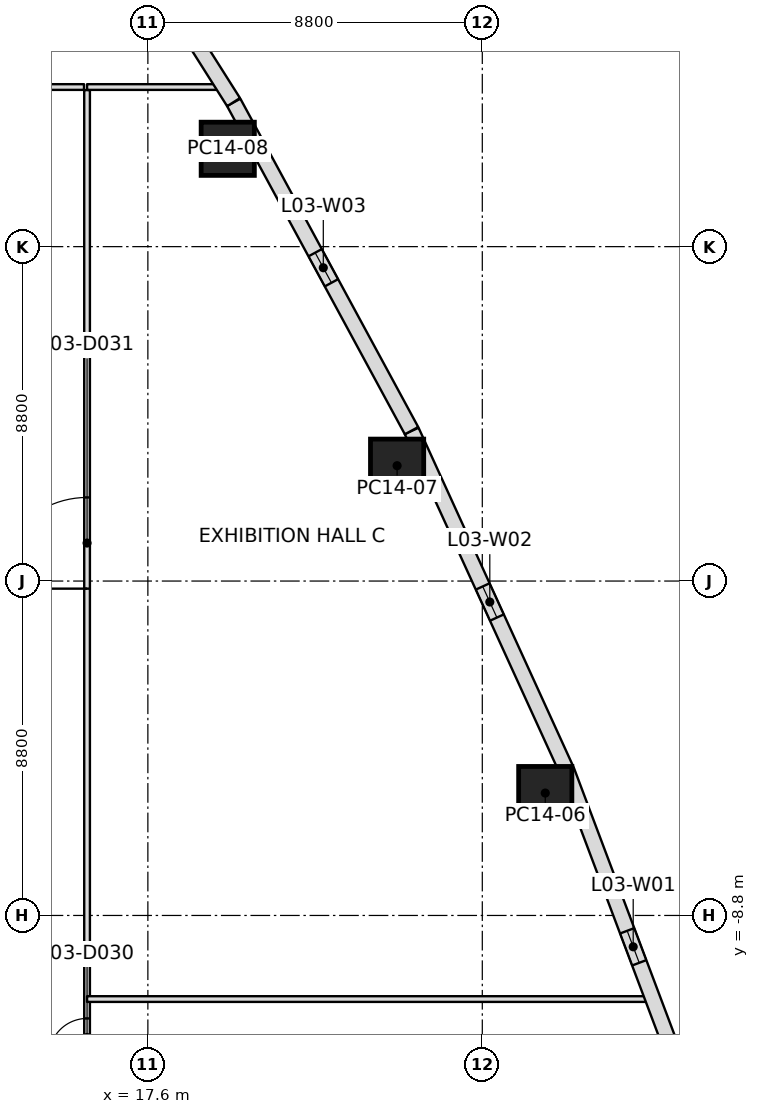
"""IFC4 building model, lengths in metres.
Left out: names, types, materials, properties, quantities, classifications, styles, units other than length and angle.
Written with IfcOpenShell. Run it as: python <this file> out.ifc"""

import sys

from ifc_helpers import new_model, si_unit, direction, frame, frame_2d, origin, origin_2d, place, context, subcontext, project, spatial, rectangle, extrude, element, fill, save


model = new_model("IFC4")
c1 = context("Model", 3, precision=1e-05, world=origin(), true_north=direction((0.0, 1.0)))
c2 = subcontext(c1, "Body", "Model", "MODEL_VIEW")
j1 = project(units=[si_unit("LENGTHUNIT", "METRE"), si_unit("PLANEANGLEUNIT", "RADIAN")], contexts=[c1])
p1 = place(None, origin())
s1 = spatial("IfcSite", under=j1, at=p1, CompositionType="ELEMENT")
p2 = place(p1, origin())
s2 = spatial("IfcBuilding", under=s1, at=p2, CompositionType="ELEMENT")
p3 = place(p2, frame((0.0, 0.0, 22.2)))
s3 = spatial("IfcBuildingStorey", under=s2, at=p3, CompositionType="ELEMENT", Elevation=22.2)
for number, where, z_axis, x_axis in (
    (1, (28.057, -5.579, 0.0), (0.0, 0.0, 1.0), (-0.382, 0.924, 0.0)),
    (2, (24.158, 3.035, 0.0), (0.0, 0.0, 1.0), (-0.442, 0.897, 0.0)),
    (3, (19.702, 11.375, 0.0), (0.0, 0.0, 1.0), (-0.5, 0.866, 0.0)),
):
    element("IfcColumn", number, at=place(p3, frame(where, z_axis=z_axis, x_axis=x_axis)), inside=s3, PredefinedType="COLUMN", context=c2, shape_type="SweptSolid", body=[
        extrude(rectangle(XDim=1.4, YDim=1.4, at=origin_2d()), origin(), (0.0, 0.0, 1.0), 6.6),
    ])
p4 = place(p3, frame((28.625, -4.993, 0.0), z_axis=(0.0, 0.0, 1.0), x_axis=(0.352569865932, -0.935785493389, 0.0)))
e4 = element("IfcWall", 4, at=p4, inside=s3, PredefinedType="STANDARD", context=c2, shape_type="SweptSolid", body=[
    extrude(rectangle(XDim=9.838, YDim=0.4, at=frame_2d((4.919, 0.0))), origin(), (0.0, 0.0, 1.0), 5.7),
])
p5 = place(p4, frame((4.5, 0.0, 0.9)))
e5 = element("IfcOpeningElement", 5, at=p5, cuts=e4, PredefinedType="OPENING", context=c2, shape_type="SweptSolid", body=[
    extrude(rectangle(XDim=0.9, YDim=3.3, at=frame_2d((0.45, 1.65))), frame((0.0, 0.2, 0.0), z_axis=(0.0, -1.0, 0.0), x_axis=(1.0, 0.0, 0.0)), (0.0, 0.0, 1.0), 0.4),
])
p6 = place(p3, frame((24.541, 3.951, 0.0), z_axis=(0.0, 0.0, 1.0), x_axis=(0.415399179946, -0.909639225902, 0.0)))
e6 = element("IfcWall", 6, at=p6, inside=s3, PredefinedType="STANDARD", context=c2, shape_type="SweptSolid", body=[
    extrude(rectangle(XDim=9.826, YDim=0.4, at=frame_2d((4.913, 0.0))), origin(), (0.0, 0.0, 1.0), 5.7),
])
p7 = place(p6, frame((4.5, 0.0, 0.9)))
e7 = element("IfcOpeningElement", 7, at=p7, cuts=e6, PredefinedType="OPENING", context=c2, shape_type="SweptSolid", body=[
    extrude(rectangle(XDim=0.9, YDim=3.3, at=frame_2d((0.45, 1.65))), frame((0.0, 0.2, 0.0), z_axis=(0.0, -1.0, 0.0), x_axis=(1.0, 0.0, 0.0)), (0.0, 0.0, 1.0), 0.4),
])
p8 = place(p3, frame((19.859, 12.597, 0.0), z_axis=(0.0, 0.0, 1.0), x_axis=(0.476254331716, -0.879307575039, 0.0)))
e8 = element("IfcWall", 8, at=p8, inside=s3, PredefinedType="STANDARD", context=c2, shape_type="SweptSolid", body=[
    extrude(rectangle(XDim=9.825, YDim=0.4, at=frame_2d((4.913, 0.0))), origin(), (0.0, 0.0, 1.0), 5.7),
])
p9 = place(p8, frame((4.5, 0.0, 0.9)))
e9 = element("IfcOpeningElement", 9, at=p9, cuts=e8, PredefinedType="OPENING", context=c2, shape_type="SweptSolid", body=[
    extrude(rectangle(XDim=0.9, YDim=3.3, at=frame_2d((0.45, 1.65))), frame((0.0, 0.2, 0.0), z_axis=(0.0, -1.0, 0.0), x_axis=(1.0, 0.0, 0.0)), (0.0, 0.0, 1.0), 0.4),
])
p10 = place(p3, frame((14.599, 20.905, 0.0), z_axis=(0.0, 0.0, 1.0), x_axis=(0.534912566476, -0.844907418731, 0.0)))
e10 = element("IfcWall", 10, at=p10, inside=s3, PredefinedType="STANDARD", context=c2, shape_type="SweptSolid", body=[
    extrude(rectangle(XDim=9.826, YDim=0.4, at=frame_2d((4.913, 0.0))), origin(), (0.0, 0.0, 1.0), 5.7),
])
p11 = place(p10, frame((4.5, 0.0, 0.9)))
e11 = element("IfcOpeningElement", 11, at=p11, cuts=e10, PredefinedType="OPENING", context=c2, shape_type="SweptSolid", body=[
    extrude(rectangle(XDim=0.9, YDim=3.3, at=frame_2d((0.45, 1.65))), frame((0.0, 0.2, 0.0), z_axis=(0.0, -1.0, 0.0), x_axis=(1.0, 0.0, 0.0)), (0.0, 0.0, 1.0), 0.4),
])
p12 = place(p3, frame((16.0, -11.0, 0.0), z_axis=(0.0, 0.0, 1.0), x_axis=(1.0, 0.0, 0.0)))
e12 = element("IfcWall", 12, at=p12, inside=s3, PredefinedType="PARTITIONING", context=c2, shape_type="SweptSolid", body=[
    extrude(rectangle(XDim=14.839, YDim=0.15, at=frame_2d((7.419, 0.0))), origin(), (0.0, 0.0, 1.0), 5.447),
])
p13 = place(p3, frame((19.479, 13.0, 0.0), z_axis=(0.0, 0.0, 1.0), x_axis=(-1.0, 0.0, 0.0)))
e13 = element("IfcWall", 13, at=p13, inside=s3, PredefinedType="PARTITIONING", context=c2, shape_type="SweptSolid", body=[
    extrude(rectangle(XDim=3.479, YDim=0.15, at=frame_2d((1.74, 0.0))), origin(), (0.0, 0.0, 1.0), 5.734),
])
p14 = place(p3, frame((15.92, 13.0, 0.0), z_axis=(0.0, 0.0, 1.0), x_axis=(-1.0, 0.0, 0.0)))
e14 = element("IfcWall", 14, at=p14, inside=s3, PredefinedType="PARTITIONING", context=c2, shape_type="SweptSolid", body=[
    extrude(rectangle(XDim=31.84, YDim=0.15, at=frame_2d((15.92, 0.0))), origin(), (0.0, 0.0, 1.0), 5.447),
])
p15 = place(p14, frame((5.32, 0.0, 0.0)))
e15 = element("IfcOpeningElement", 15, at=p15, cuts=e14, PredefinedType="OPENING", context=c2, shape_type="SweptSolid", body=[
    extrude(rectangle(XDim=1.0, YDim=2.1, at=frame_2d((0.5, 1.05))), frame((0.0, 0.075, 0.0), z_axis=(0.0, -1.0, 0.0), x_axis=(1.0, 0.0, 0.0)), (0.0, 0.0, 1.0), 0.15),
])
p16 = place(p14, frame((1.26, 0.0, 0.0)))
e16 = element("IfcOpeningElement", 16, at=p16, cuts=e14, PredefinedType="OPENING", context=c2, shape_type="SweptSolid", body=[
    extrude(rectangle(XDim=1.0, YDim=2.1, at=frame_2d((0.5, 1.05))), frame((0.0, 0.075, 0.0), z_axis=(0.0, -1.0, 0.0), x_axis=(1.0, 0.0, 0.0)), (0.0, 0.0, 1.0), 0.15),
])
p17 = place(p14, frame((18.73, 0.0, 0.0)))
e17 = element("IfcOpeningElement", 17, at=p17, cuts=e14, PredefinedType="OPENING", context=c2, shape_type="SweptSolid", body=[
    extrude(rectangle(XDim=2.4, YDim=2.1, at=frame_2d((1.2, 1.05))), frame((0.0, 0.075, 0.0), z_axis=(0.0, -1.0, 0.0), x_axis=(1.0, 0.0, 0.0)), (0.0, 0.0, 1.0), 0.15),
])
p18 = place(p3, frame((16.0, -12.92, 0.0), z_axis=(0.0, 0.0, 1.0), x_axis=(0.0, 1.0, 0.0)))
e18 = element("IfcWall", 18, at=p18, inside=s3, PredefinedType="PARTITIONING", context=c2, shape_type="SweptSolid", body=[
    extrude(rectangle(XDim=25.84, YDim=0.15, at=frame_2d((12.92, 0.0))), origin(), (0.0, 0.0, 1.0), 5.447),
])
p19 = place(p18, frame((0.41, 0.0, 0.0)))
e19 = element("IfcOpeningElement", 19, at=p19, cuts=e18, PredefinedType="OPENING", context=c2, shape_type="SweptSolid", body=[
    extrude(rectangle(XDim=1.0, YDim=2.1, at=frame_2d((0.5, 1.05))), frame((0.0, 0.075, 0.0), z_axis=(0.0, -1.0, 0.0), x_axis=(1.0, 0.0, 0.0)), (0.0, 0.0, 1.0), 0.15),
])
p20 = place(p18, frame((12.72, 0.0, 0.0)))
e20 = element("IfcOpeningElement", 20, at=p20, cuts=e18, PredefinedType="OPENING", context=c2, shape_type="SweptSolid", body=[
    extrude(rectangle(XDim=2.4, YDim=2.1, at=frame_2d((1.2, 1.05))), frame((0.0, 0.075, 0.0), z_axis=(0.0, -1.0, 0.0), x_axis=(1.0, 0.0, 0.0)), (0.0, 0.0, 1.0), 0.15),
])
p21 = place(p5, origin())
e21 = element("IfcWindow", 21, at=p21, inside=s3, PartitioningType="SINGLE_PANEL", PredefinedType="WINDOW", context=c2, shape_type="SweptSolid", body=[
    extrude(rectangle(XDim=0.9, YDim=3.3, at=frame_2d((0.45, 1.65))), frame((0.0, 0.03, 0.0), z_axis=(0.0, -1.0, 0.0), x_axis=(1.0, 0.0, 0.0)), (0.0, 0.0, 1.0), 0.06),
])
fill(e5, e21)
p22 = place(p7, origin())
e22 = element("IfcWindow", 22, at=p22, inside=s3, PartitioningType="SINGLE_PANEL", PredefinedType="WINDOW", context=c2, shape_type="SweptSolid", body=[
    extrude(rectangle(XDim=0.9, YDim=3.3, at=frame_2d((0.45, 1.65))), frame((0.0, 0.03, 0.0), z_axis=(0.0, -1.0, 0.0), x_axis=(1.0, 0.0, 0.0)), (0.0, 0.0, 1.0), 0.06),
])
fill(e7, e22)
p23 = place(p9, origin())
e23 = element("IfcWindow", 23, at=p23, inside=s3, PartitioningType="SINGLE_PANEL", PredefinedType="WINDOW", context=c2, shape_type="SweptSolid", body=[
    extrude(rectangle(XDim=0.9, YDim=3.3, at=frame_2d((0.45, 1.65))), frame((0.0, 0.03, 0.0), z_axis=(0.0, -1.0, 0.0), x_axis=(1.0, 0.0, 0.0)), (0.0, 0.0, 1.0), 0.06),
])
fill(e9, e23)
p24 = place(p19, origin())
e24 = element("IfcDoor", 24, at=p24, inside=s3, OperationType="SINGLE_SWING_RIGHT", PredefinedType="DOOR", context=c2, shape_type="SweptSolid", body=[
    extrude(rectangle(XDim=1.0, YDim=2.1, at=frame_2d((0.5, 1.05))), frame((0.0, 0.025, 0.0), z_axis=(0.0, -1.0, 0.0), x_axis=(1.0, 0.0, 0.0)), (0.0, 0.0, 1.0), 0.05),
])
fill(e19, e24)
p25 = place(p20, origin())
e25 = element("IfcDoor", 25, at=p25, inside=s3, OperationType="DOUBLE_DOOR_SINGLE_SWING", PredefinedType="DOOR", context=c2, shape_type="SweptSolid", body=[
    extrude(rectangle(XDim=2.4, YDim=2.1, at=frame_2d((1.2, 1.05))), frame((0.0, 0.025, 0.0), z_axis=(0.0, -1.0, 0.0), x_axis=(1.0, 0.0, 0.0)), (0.0, 0.0, 1.0), 0.05),
])
fill(e20, e25)
save(model, sys.argv[1])
